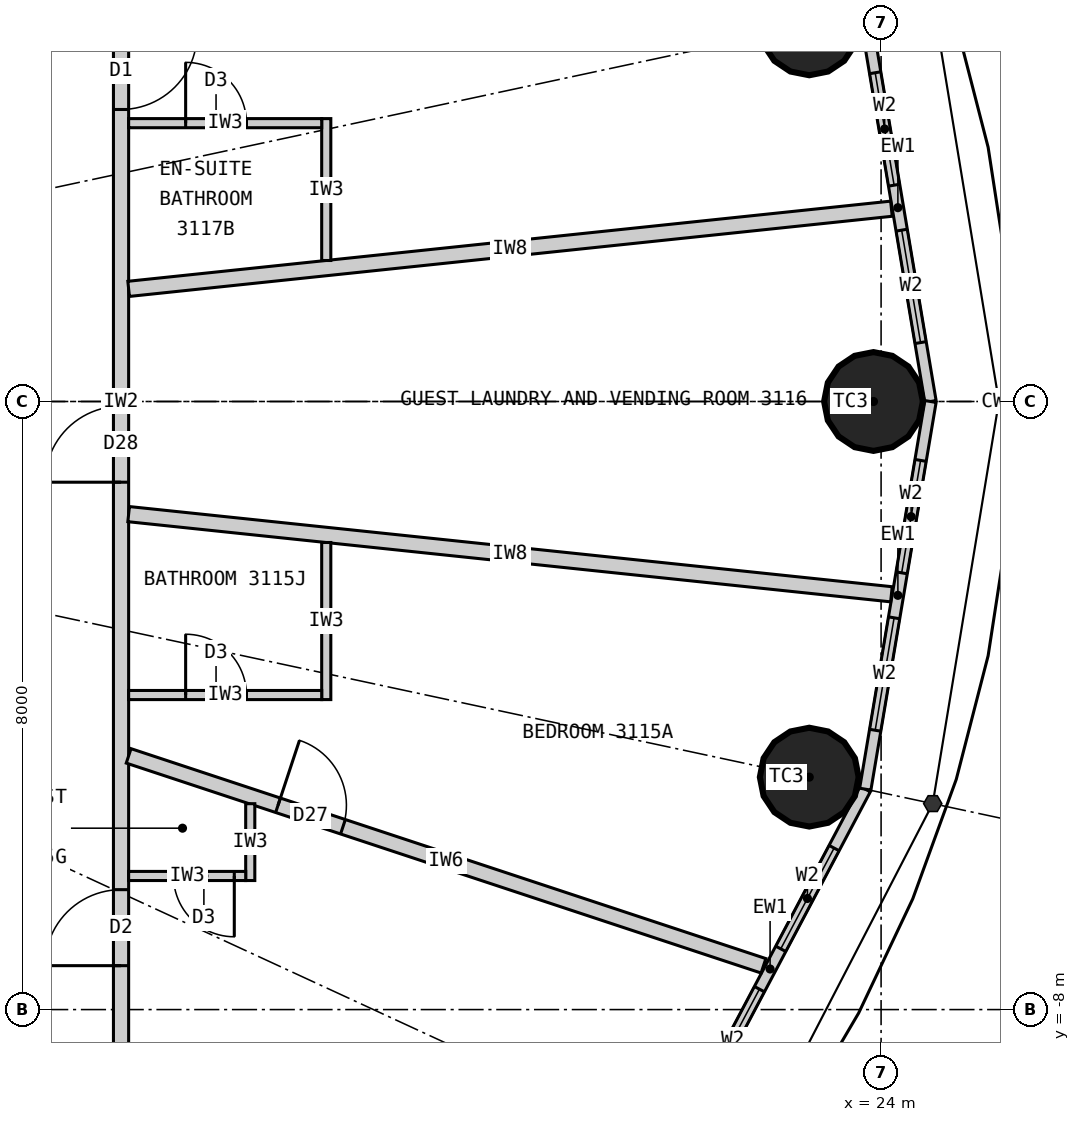
"""IFC4 building model, lengths in metres.
Left out: names, types, materials, properties, quantities, classifications, styles, units other than length and angle.
Written with IfcOpenShell. Run it as: python <this file> out.ifc"""

import sys

from ifc_helpers import new_model, si_unit, direction, frame, frame_2d, origin, origin_2d, place, context, subcontext, project, spatial, rectangle, circle, extrude, element, fill, save


model = new_model("IFC4")
c1 = context("Model", 3, precision=1e-05, world=origin(), true_north=direction((0.0, 1.0)))
c2 = subcontext(c1, "Body", "Model", "MODEL_VIEW")
j1 = project(units=[si_unit("LENGTHUNIT", "METRE"), si_unit("PLANEANGLEUNIT", "RADIAN")], contexts=[c1])
p1 = place(None, origin())
s1 = spatial("IfcSite", under=j1, at=p1, CompositionType="ELEMENT")
p2 = place(p1, origin())
s2 = spatial("IfcBuilding", under=s1, at=p2, CompositionType="ELEMENT")
p3 = place(p2, frame((0.0, 0.0, 122.1)))
s3 = spatial("IfcBuildingStorey", under=s2, at=p3, CompositionType="ELEMENT", Elevation=122.1)
for number, where, z_axis, x_axis in (
    (1, (23.9, 0.0, 0.0), (0.0, 0.0, 1.0), (1.0, 0.0, 0.0)),
    (2, (23.055, 4.942, 0.0), (0.0, 0.0, 1.0), (1.0, 0.0, 0.0)),
    (3, (23.055, -4.942, 0.0), (0.0, 0.0, 1.0), (1.0, 0.0, 0.0)),
):
    element("IfcColumn", number, at=place(p3, frame(where, z_axis=z_axis, x_axis=x_axis)), inside=s3, PredefinedType="COLUMN", context=c2, shape_type="SweptSolid", body=[
        extrude(circle(Radius=0.65, at=origin_2d()), origin(), (0.0, 0.0, 1.0), 3.3),
    ])
p4 = place(p3, frame((24.65, 0.0, 0.0), z_axis=(0.0, 0.0, 1.0), x_axis=(-0.165883894218, 0.986145290329, 0.0)))
e4 = element("IfcWall", 4, at=p4, inside=s3, PredefinedType="ELEMENTEDWALL", context=c2, shape_type="SweptSolid", body=[
    extrude(rectangle(XDim=5.172, YDim=0.15, at=frame_2d((2.586, 0.0))), origin(), (0.0, 0.0, 1.0), 3.12),
])
p5 = place(p4, frame((0.786, 0.0, 0.9)))
e5 = element("IfcOpeningElement", 5, at=p5, cuts=e4, PredefinedType="OPENING", context=c2, shape_type="SweptSolid", body=[
    extrude(rectangle(XDim=1.5, YDim=1.9, at=frame_2d((0.75, 0.95))), frame((0.0, 0.085, 0.0), z_axis=(0.0, -1.0, 0.0), x_axis=(1.0, 0.0, 0.0)), (0.0, 0.0, 1.0), 0.17),
])
p6 = place(p4, frame((2.886, 0.0, 0.9)))
e6 = element("IfcOpeningElement", 6, at=p6, cuts=e4, PredefinedType="OPENING", context=c2, shape_type="SweptSolid", body=[
    extrude(rectangle(XDim=1.5, YDim=1.9, at=frame_2d((0.75, 0.95))), frame((0.0, 0.085, 0.0), z_axis=(0.0, -1.0, 0.0), x_axis=(1.0, 0.0, 0.0)), (0.0, 0.0, 1.0), 0.17),
])
p7 = place(p3, frame((21.287, -9.832, 0.0), z_axis=(0.0, 0.0, 1.0), x_axis=(0.467814388454, 0.883826735257, 0.0)))
e7 = element("IfcWall", 7, at=p7, inside=s3, PredefinedType="ELEMENTEDWALL", context=c2, shape_type="SweptSolid", body=[
    extrude(rectangle(XDim=5.354, YDim=0.15, at=frame_2d((2.677, 0.0))), origin(), (0.0, 0.0, 1.0), 3.12),
])
p8 = place(p7, frame((0.877, 0.0, 0.9)))
e8 = element("IfcOpeningElement", 8, at=p8, cuts=e7, PredefinedType="OPENING", context=c2, shape_type="SweptSolid", body=[
    extrude(rectangle(XDim=1.5, YDim=1.9, at=frame_2d((0.75, 0.95))), frame((0.0, 0.085, 0.0), z_axis=(0.0, -1.0, 0.0), x_axis=(1.0, 0.0, 0.0)), (0.0, 0.0, 1.0), 0.17),
])
p9 = place(p7, frame((2.977, 0.0, 0.9)))
e9 = element("IfcOpeningElement", 9, at=p9, cuts=e7, PredefinedType="OPENING", context=c2, shape_type="SweptSolid", body=[
    extrude(rectangle(XDim=1.5, YDim=1.9, at=frame_2d((0.75, 0.95))), frame((0.0, 0.085, 0.0), z_axis=(0.0, -1.0, 0.0), x_axis=(1.0, 0.0, 0.0)), (0.0, 0.0, 1.0), 0.17),
])
p10 = place(p3, frame((23.792, -5.1, 0.0), z_axis=(0.0, 0.0, 1.0), x_axis=(0.165883894218, 0.986145290329, 0.0)))
e10 = element("IfcWall", 10, at=p10, inside=s3, PredefinedType="ELEMENTEDWALL", context=c2, shape_type="SweptSolid", body=[
    extrude(rectangle(XDim=5.172, YDim=0.15, at=frame_2d((2.586, 0.0))), origin(), (0.0, 0.0, 1.0), 3.12),
])
p11 = place(p10, frame((0.786, 0.0, 0.9)))
e11 = element("IfcOpeningElement", 11, at=p11, cuts=e10, PredefinedType="OPENING", context=c2, shape_type="SweptSolid", body=[
    extrude(rectangle(XDim=1.5, YDim=1.9, at=frame_2d((0.75, 0.95))), frame((0.0, 0.085, 0.0), z_axis=(0.0, -1.0, 0.0), x_axis=(1.0, 0.0, 0.0)), (0.0, 0.0, 1.0), 0.17),
])
p12 = place(p10, frame((2.886, 0.0, 0.9)))
e12 = element("IfcOpeningElement", 12, at=p12, cuts=e10, PredefinedType="OPENING", context=c2, shape_type="SweptSolid", body=[
    extrude(rectangle(XDim=1.5, YDim=1.9, at=frame_2d((0.75, 0.95))), frame((0.0, 0.085, 0.0), z_axis=(0.0, -1.0, 0.0), x_axis=(1.0, 0.0, 0.0)), (0.0, 0.0, 1.0), 0.17),
])
p13 = place(p3, frame((14.0, -9.9, 0.0), z_axis=(0.0, 0.0, 1.0), x_axis=(0.0, 1.0, 0.0)))
e13 = element("IfcWall", 13, at=p13, inside=s3, PredefinedType="PARTITIONING", context=c2, shape_type="SweptSolid", body=[
    extrude(rectangle(XDim=19.8, YDim=0.2, at=frame_2d((9.9, 0.0))), origin(), (0.0, 0.0, 1.0), 3.12),
])
p14 = place(p13, frame((2.478, 0.0, 0.0)))
e14 = element("IfcOpeningElement", 14, at=p14, cuts=e13, PredefinedType="OPENING", context=c2, shape_type="SweptSolid", body=[
    extrude(rectangle(XDim=1.0, YDim=2.2, at=frame_2d((0.5, 1.1))), frame((0.0, 0.11, 0.0), z_axis=(0.0, -1.0, 0.0), x_axis=(1.0, 0.0, 0.0)), (0.0, 0.0, 1.0), 0.22),
])
p15 = place(p13, frame((8.838, 0.0, 0.0)))
e15 = element("IfcOpeningElement", 15, at=p15, cuts=e13, PredefinedType="OPENING", context=c2, shape_type="SweptSolid", body=[
    extrude(rectangle(XDim=1.0, YDim=2.2, at=frame_2d((0.5, 1.1))), frame((0.0, 0.11, 0.0), z_axis=(0.0, -1.0, 0.0), x_axis=(1.0, 0.0, 0.0)), (0.0, 0.0, 1.0), 0.22),
])
p16 = place(p13, frame((13.742, 0.0, 0.0)))
e16 = element("IfcOpeningElement", 16, at=p16, cuts=e13, PredefinedType="OPENING", context=c2, shape_type="SweptSolid", body=[
    extrude(rectangle(XDim=1.0, YDim=2.2, at=frame_2d((0.5, 1.1))), frame((0.0, 0.11, 0.0), z_axis=(0.0, -1.0, 0.0), x_axis=(1.0, 0.0, 0.0)), (0.0, 0.0, 1.0), 0.22),
])
p17 = place(p13, frame((18.698, 0.0, 0.0)))
e17 = element("IfcOpeningElement", 17, at=p17, cuts=e13, PredefinedType="OPENING", context=c2, shape_type="SweptSolid", body=[
    extrude(rectangle(XDim=1.0, YDim=2.2, at=frame_2d((0.5, 1.1))), frame((0.0, 0.11, 0.0), z_axis=(0.0, -1.0, 0.0), x_axis=(1.0, 0.0, 0.0)), (0.0, 0.0, 1.0), 0.22),
])
p18 = place(p3, frame((14.1, 1.482, 0.0), z_axis=(0.0, 0.0, 1.0), x_axis=(0.994523202615, 0.104516024894, 0.0)))
e18 = element("IfcWall", 18, at=p18, inside=s3, PredefinedType="PARTITIONING", context=c2, shape_type="SweptSolid", body=[
    extrude(rectangle(XDim=10.091, YDim=0.2, at=frame_2d((5.045, 0.0))), origin(), (0.0, 0.0, 1.0), 2.47),
])
p19 = place(p3, frame((14.1, -4.662, 0.0), z_axis=(0.0, 0.0, 1.0), x_axis=(0.949446466373, -0.313928984789, 0.0)))
e19 = element("IfcWall", 19, at=p19, inside=s3, PredefinedType="PARTITIONING", context=c2, shape_type="SweptSolid", body=[
    extrude(rectangle(XDim=8.797, YDim=0.2, at=frame_2d((4.399, 0.0))), origin(), (0.0, 0.0, 1.0), 3.12),
])
p20 = place(p19, frame((2.07, 0.0, 0.0)))
e20 = element("IfcOpeningElement", 20, at=p20, cuts=e19, PredefinedType="OPENING", context=c2, shape_type="SweptSolid", body=[
    extrude(rectangle(XDim=0.9, YDim=2.1, at=frame_2d((0.45, 1.05))), frame((0.0, 0.11, 0.0), z_axis=(0.0, -1.0, 0.0), x_axis=(1.0, 0.0, 0.0)), (0.0, 0.0, 1.0), 0.22),
])
p21 = place(p3, frame((14.1, -1.482, 0.0), z_axis=(0.0, 0.0, 1.0), x_axis=(0.994523202615, -0.104516024894, 0.0)))
e21 = element("IfcWall", 21, at=p21, inside=s3, PredefinedType="PARTITIONING", context=c2, shape_type="SweptSolid", body=[
    extrude(rectangle(XDim=10.091, YDim=0.2, at=frame_2d((5.045, 0.0))), origin(), (0.0, 0.0, 1.0), 2.47),
])
p22 = place(p3, frame((15.7, -5.291, 0.0), z_axis=(0.0, 0.0, 1.0), x_axis=(0.0, -1.0, 0.0)))
e22 = element("IfcWall", 22, at=p22, inside=s3, PredefinedType="PARTITIONING", context=c2, shape_type="SweptSolid", body=[
    extrude(rectangle(XDim=1.011, YDim=0.12, at=frame_2d((0.505, 0.0))), origin(), (0.0, 0.0, 1.0), 3.12),
])
p23 = place(p3, frame((14.1, -6.242, 0.0), z_axis=(0.0, 0.0, 1.0), x_axis=(1.0, 0.0, 0.0)))
e23 = element("IfcWall", 23, at=p23, inside=s3, PredefinedType="PARTITIONING", context=c2, shape_type="SweptSolid", body=[
    extrude(rectangle(XDim=1.54, YDim=0.12, at=frame_2d((0.77, 0.0))), origin(), (0.0, 0.0, 1.0), 3.12),
])
p24 = place(p23, frame((0.59, 0.0, 0.0)))
e24 = element("IfcOpeningElement", 24, at=p24, cuts=e23, PredefinedType="OPENING", context=c2, shape_type="SweptSolid", body=[
    extrude(rectangle(XDim=0.8, YDim=2.1, at=frame_2d((0.4, 1.05))), frame((0.0, 0.07, 0.0), z_axis=(0.0, -1.0, 0.0), x_axis=(1.0, 0.0, 0.0)), (0.0, 0.0, 1.0), 0.14),
])
p25 = place(p3, frame((16.7, -1.855, 0.0), z_axis=(0.0, 0.0, 1.0), x_axis=(0.0, -1.0, 0.0)))
e25 = element("IfcWall", 25, at=p25, inside=s3, PredefinedType="PARTITIONING", context=c2, shape_type="SweptSolid", body=[
    extrude(rectangle(XDim=2.067, YDim=0.12, at=frame_2d((1.033, 0.0))), origin(), (0.0, 0.0, 1.0), 3.12),
])
p26 = place(p3, frame((14.1, -3.862, 0.0), z_axis=(0.0, 0.0, 1.0), x_axis=(1.0, 0.0, 0.0)))
e26 = element("IfcWall", 26, at=p26, inside=s3, PredefinedType="PARTITIONING", context=c2, shape_type="SweptSolid", body=[
    extrude(rectangle(XDim=2.54, YDim=0.12, at=frame_2d((1.27, 0.0))), origin(), (0.0, 0.0, 1.0), 2.37),
])
p27 = place(p26, frame((0.75, 0.0, 0.0)))
e27 = element("IfcOpeningElement", 27, at=p27, cuts=e26, PredefinedType="OPENING", context=c2, shape_type="SweptSolid", body=[
    extrude(rectangle(XDim=0.8, YDim=2.1, at=frame_2d((0.4, 1.05))), frame((0.0, 0.07, 0.0), z_axis=(0.0, -1.0, 0.0), x_axis=(1.0, 0.0, 0.0)), (0.0, 0.0, 1.0), 0.14),
])
p28 = place(p3, frame((16.7, 1.855, 0.0), z_axis=(0.0, 0.0, 1.0), x_axis=(0.0, 1.0, 0.0)))
e28 = element("IfcWall", 28, at=p28, inside=s3, PredefinedType="PARTITIONING", context=c2, shape_type="SweptSolid", body=[
    extrude(rectangle(XDim=1.867, YDim=0.12, at=frame_2d((0.933, 0.0))), origin(), (0.0, 0.0, 1.0), 3.12),
])
p29 = place(p3, frame((14.1, 3.662, 0.0), z_axis=(0.0, 0.0, 1.0), x_axis=(1.0, 0.0, 0.0)))
e29 = element("IfcWall", 29, at=p29, inside=s3, PredefinedType="PARTITIONING", context=c2, shape_type="SweptSolid", body=[
    extrude(rectangle(XDim=2.54, YDim=0.12, at=frame_2d((1.27, 0.0))), origin(), (0.0, 0.0, 1.0), 2.37),
])
p30 = place(p29, frame((0.75, 0.0, 0.0)))
e30 = element("IfcOpeningElement", 30, at=p30, cuts=e29, PredefinedType="OPENING", context=c2, shape_type="SweptSolid", body=[
    extrude(rectangle(XDim=0.8, YDim=2.1, at=frame_2d((0.4, 1.05))), frame((0.0, 0.07, 0.0), z_axis=(0.0, -1.0, 0.0), x_axis=(1.0, 0.0, 0.0)), (0.0, 0.0, 1.0), 0.14),
])
p31 = place(p5, origin())
e31 = element("IfcWindow", 31, at=p31, inside=s3, PartitioningType="SINGLE_PANEL", PredefinedType="WINDOW", context=c2, shape_type="SweptSolid", body=[
    extrude(rectangle(XDim=1.5, YDim=1.9, at=frame_2d((0.75, 0.95))), frame((0.0, 0.03, 0.0), z_axis=(0.0, -1.0, 0.0), x_axis=(1.0, 0.0, 0.0)), (0.0, 0.0, 1.0), 0.06),
])
fill(e5, e31)
p32 = place(p6, origin())
e32 = element("IfcWindow", 32, at=p32, inside=s3, PartitioningType="SINGLE_PANEL", PredefinedType="WINDOW", context=c2, shape_type="SweptSolid", body=[
    extrude(rectangle(XDim=1.5, YDim=1.9, at=frame_2d((0.75, 0.95))), frame((0.0, 0.03, 0.0), z_axis=(0.0, -1.0, 0.0), x_axis=(1.0, 0.0, 0.0)), (0.0, 0.0, 1.0), 0.06),
])
fill(e6, e32)
p33 = place(p8, origin())
e33 = element("IfcWindow", 33, at=p33, inside=s3, PartitioningType="SINGLE_PANEL", PredefinedType="WINDOW", context=c2, shape_type="SweptSolid", body=[
    extrude(rectangle(XDim=1.5, YDim=1.9, at=frame_2d((0.75, 0.95))), frame((0.0, 0.03, 0.0), z_axis=(0.0, -1.0, 0.0), x_axis=(1.0, 0.0, 0.0)), (0.0, 0.0, 1.0), 0.06),
])
fill(e8, e33)
p34 = place(p9, origin())
e34 = element("IfcWindow", 34, at=p34, inside=s3, PartitioningType="SINGLE_PANEL", PredefinedType="WINDOW", context=c2, shape_type="SweptSolid", body=[
    extrude(rectangle(XDim=1.5, YDim=1.9, at=frame_2d((0.75, 0.95))), frame((0.0, 0.03, 0.0), z_axis=(0.0, -1.0, 0.0), x_axis=(1.0, 0.0, 0.0)), (0.0, 0.0, 1.0), 0.06),
])
fill(e9, e34)
p35 = place(p11, origin())
e35 = element("IfcWindow", 35, at=p35, inside=s3, PartitioningType="SINGLE_PANEL", PredefinedType="WINDOW", context=c2, shape_type="SweptSolid", body=[
    extrude(rectangle(XDim=1.5, YDim=1.9, at=frame_2d((0.75, 0.95))), frame((0.0, 0.03, 0.0), z_axis=(0.0, -1.0, 0.0), x_axis=(1.0, 0.0, 0.0)), (0.0, 0.0, 1.0), 0.06),
])
fill(e11, e35)
p36 = place(p12, origin())
e36 = element("IfcWindow", 36, at=p36, inside=s3, PartitioningType="SINGLE_PANEL", PredefinedType="WINDOW", context=c2, shape_type="SweptSolid", body=[
    extrude(rectangle(XDim=1.5, YDim=1.9, at=frame_2d((0.75, 0.95))), frame((0.0, 0.03, 0.0), z_axis=(0.0, -1.0, 0.0), x_axis=(1.0, 0.0, 0.0)), (0.0, 0.0, 1.0), 0.06),
])
fill(e12, e36)
p37 = place(p24, origin())
e37 = element("IfcDoor", 37, at=p37, inside=s3, OperationType="SINGLE_SWING_RIGHT", PredefinedType="DOOR", context=c2, shape_type="SweptSolid", body=[
    extrude(rectangle(XDim=0.8, YDim=2.1, at=frame_2d((0.4, 1.05))), frame((0.0, 0.025, 0.0), z_axis=(0.0, -1.0, 0.0), x_axis=(1.0, 0.0, 0.0)), (0.0, 0.0, 1.0), 0.05),
])
fill(e24, e37)
p38 = place(p14, origin())
e38 = element("IfcDoor", 38, at=p38, inside=s3, OperationType="SINGLE_SWING_LEFT", PredefinedType="DOOR", context=c2, shape_type="SweptSolid", body=[
    extrude(rectangle(XDim=1.0, YDim=2.2, at=frame_2d((0.5, 1.1))), frame((0.0, 0.025, 0.0), z_axis=(0.0, -1.0, 0.0), x_axis=(1.0, 0.0, 0.0)), (0.0, 0.0, 1.0), 0.05),
])
fill(e14, e38)
p39 = place(p27, origin())
e39 = element("IfcDoor", 39, at=p39, inside=s3, OperationType="SINGLE_SWING_LEFT", PredefinedType="DOOR", context=c2, shape_type="SweptSolid", body=[
    extrude(rectangle(XDim=0.8, YDim=2.1, at=frame_2d((0.4, 1.05))), frame((0.0, 0.025, 0.0), z_axis=(0.0, -1.0, 0.0), x_axis=(1.0, 0.0, 0.0)), (0.0, 0.0, 1.0), 0.05),
])
fill(e27, e39)
p40 = place(p20, origin())
e40 = element("IfcDoor", 40, at=p40, inside=s3, OperationType="SINGLE_SWING_LEFT", PredefinedType="DOOR", context=c2, shape_type="SweptSolid", body=[
    extrude(rectangle(XDim=0.9, YDim=2.1, at=frame_2d((0.45, 1.05))), frame((0.0, 0.025, 0.0), z_axis=(0.0, -1.0, 0.0), x_axis=(1.0, 0.0, 0.0)), (0.0, 0.0, 1.0), 0.05),
])
fill(e20, e40)
p41 = place(p15, origin())
e41 = element("IfcDoor", 41, at=p41, inside=s3, OperationType="SINGLE_SWING_LEFT", PredefinedType="DOOR", context=c2, shape_type="SweptSolid", body=[
    extrude(rectangle(XDim=1.0, YDim=2.2, at=frame_2d((0.5, 1.1))), frame((0.0, 0.025, 0.0), z_axis=(0.0, -1.0, 0.0), x_axis=(1.0, 0.0, 0.0)), (0.0, 0.0, 1.0), 0.05),
])
fill(e15, e41)
p42 = place(p30, origin())
e42 = element("IfcDoor", 42, at=p42, inside=s3, OperationType="SINGLE_SWING_LEFT", PredefinedType="DOOR", context=c2, shape_type="SweptSolid", body=[
    extrude(rectangle(XDim=0.8, YDim=2.1, at=frame_2d((0.4, 1.05))), frame((0.0, 0.025, 0.0), z_axis=(0.0, -1.0, 0.0), x_axis=(1.0, 0.0, 0.0)), (0.0, 0.0, 1.0), 0.05),
])
fill(e30, e42)
p43 = place(p16, origin())
e43 = element("IfcDoor", 43, at=p43, inside=s3, OperationType="SINGLE_SWING_RIGHT", PredefinedType="DOOR", context=c2, shape_type="SweptSolid", body=[
    extrude(rectangle(XDim=1.0, YDim=2.2, at=frame_2d((0.5, 1.1))), frame((0.0, 0.025, 0.0), z_axis=(0.0, -1.0, 0.0), x_axis=(1.0, 0.0, 0.0)), (0.0, 0.0, 1.0), 0.05),
])
fill(e16, e43)
save(model, sys.argv[1])
